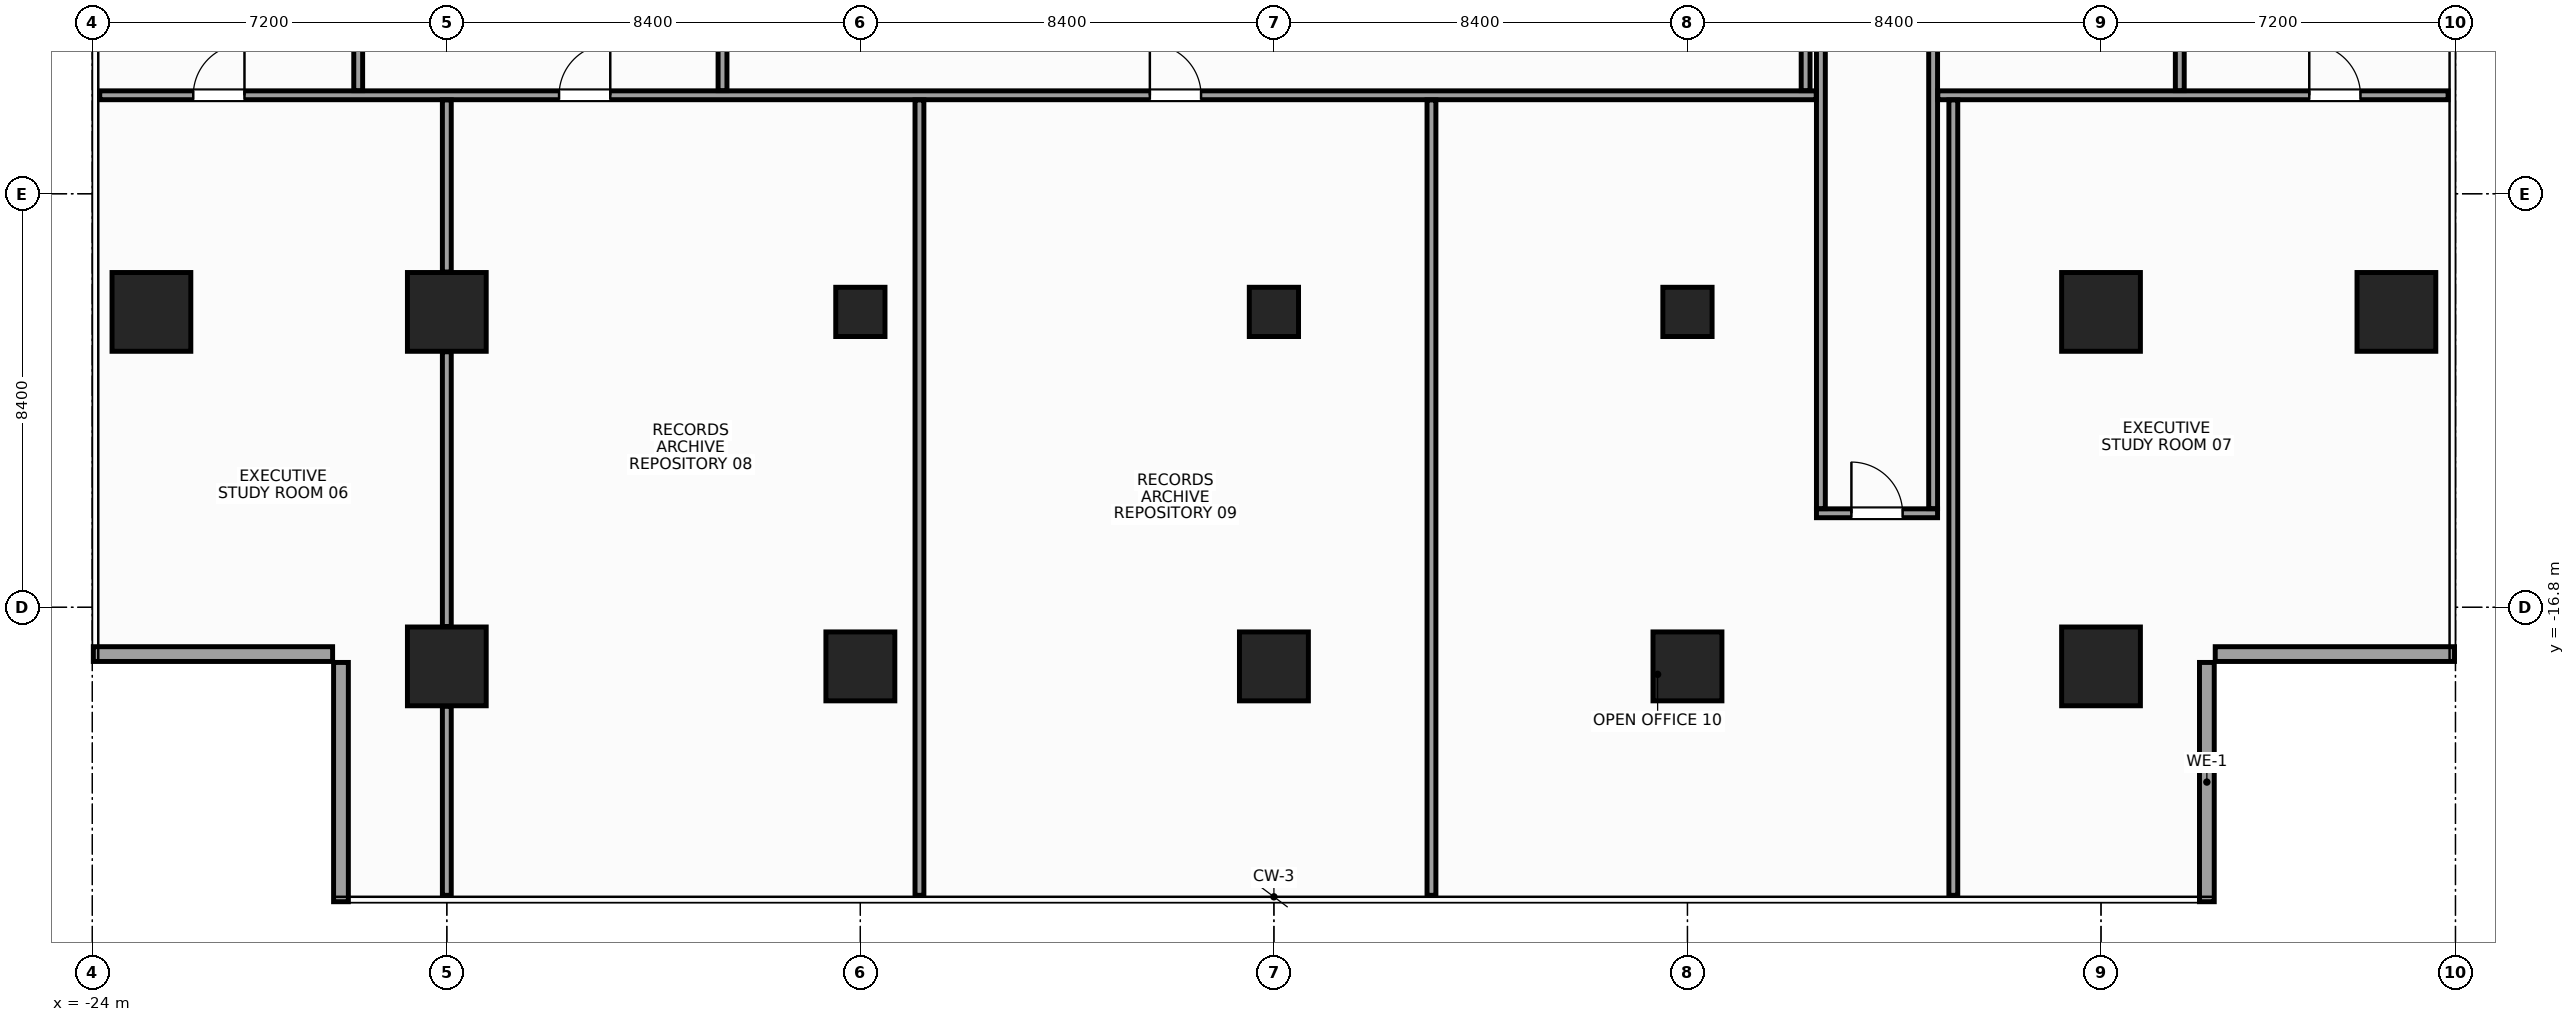
"""IFC4 building model, lengths in metres.
Left out: names, types, materials, properties, quantities, classifications, styles, units other than length and angle.
Written with IfcOpenShell. Run it as: python <this file> out.ifc"""

import sys

from ifc_helpers import new_model, si_unit, direction, frame, frame_2d, origin, origin_2d, place, context, subcontext, project, spatial, rectangle, hollow_rectangle, extrude, source, transform, mapped, element, fill, save


model = new_model("IFC4")
c1 = context("Model", 3, precision=1e-05, world=origin(), true_north=direction((0.0, 1.0)))
c2 = subcontext(c1, "Body", "Model", "MODEL_VIEW")
j1 = project(units=[si_unit("LENGTHUNIT", "METRE"), si_unit("PLANEANGLEUNIT", "RADIAN")], contexts=[c1])
p1 = place(None, origin())
s1 = spatial("IfcSite", under=j1, at=p1, CompositionType="ELEMENT")
p2 = place(p1, origin())
s2 = spatial("IfcBuilding", under=s1, at=p2, CompositionType="ELEMENT")
p3 = place(p2, frame((0.0, 0.0, 171.2)))
s3 = spatial("IfcBuildingStorey", under=s2, at=p3, CompositionType="ELEMENT", Elevation=171.2)
m1 = source(origin(), c2, "Body", "SweptSolid", [
    extrude(rectangle(XDim=1.6, YDim=1.6, at=origin_2d()), origin(), (0.0, 0.0, 1.0), 3.6),
])
for number, where, z_axis, x_axis in (
    (1, (-16.8, -18.0, 0.0), (0.0, 0.0, 1.0), (1.0, 0.0, 0.0)),
    (2, (-16.8, -10.8, 0.0), (0.0, 0.0, 1.0), (1.0, 0.0, 0.0)),
    (3, (16.8, -18.0, 0.0), (0.0, 0.0, 1.0), (1.0, 0.0, 0.0)),
    (4, (16.8, -10.8, 0.0), (0.0, 0.0, 1.0), (1.0, 0.0, 0.0)),
    (5, (-22.8, -10.8, 0.0), (0.0, 0.0, 1.0), (1.0, 0.0, 0.0)),
    (6, (22.8, -10.8, 0.0), (0.0, 0.0, 1.0), (1.0, 0.0, 0.0)),
):
    element("IfcColumn", number, at=place(p3, frame(where, z_axis=z_axis, x_axis=x_axis)), inside=s3, PredefinedType="COLUMN", context=c2, shape_type="MappedRepresentation", body=[
        mapped(m1, transform((0.0, 0.0, 0.0), x_axis=(1.0, 0.0, 0.0), y_axis=(0.0, 1.0, 0.0), z_axis=(0.0, 0.0, 1.0), scale=1.0)),
    ])
m2 = source(origin(), c2, "Body", "SweptSolid", [
    extrude(rectangle(XDim=1.4, YDim=1.4, at=origin_2d()), origin(), (0.0, 0.0, 1.0), 3.6),
])
p4 = place(p3, frame((-8.4, -18.0, 0.0), z_axis=(0.0, 0.0, 1.0), x_axis=(1.0, 0.0, 0.0)))
e7 = element("IfcColumn", 7, at=p4, inside=s3, PredefinedType="COLUMN", context=c2, shape_type="MappedRepresentation", body=[
    mapped(m2, transform((0.0, 0.0, 0.0), x_axis=(1.0, 0.0, 0.0), y_axis=(0.0, 1.0, 0.0), z_axis=(0.0, 0.0, 1.0), scale=1.0)),
])
m3 = source(origin(), c2, "Body", "SweptSolid", [
    extrude(hollow_rectangle(XDim=1.0, YDim=1.0, WallThickness=0.045, at=origin_2d()), origin(), (0.0, 0.0, 1.0), 3.6),
])
p5 = place(p3, frame((-8.4, -10.8, 0.0), z_axis=(0.0, 0.0, 1.0), x_axis=(1.0, 0.0, 0.0)))
e8 = element("IfcColumn", 8, at=p5, inside=s3, PredefinedType="COLUMN", context=c2, shape_type="MappedRepresentation", body=[
    mapped(m3, transform((0.0, 0.0, 0.0), x_axis=(1.0, 0.0, 0.0), y_axis=(0.0, 1.0, 0.0), z_axis=(0.0, 0.0, 1.0), scale=1.0)),
])
p6 = place(p3, frame((8.4, -18.0, 0.0), z_axis=(0.0, 0.0, 1.0), x_axis=(1.0, 0.0, 0.0)))
e9 = element("IfcColumn", 9, at=p6, inside=s3, PredefinedType="COLUMN", context=c2, shape_type="MappedRepresentation", body=[
    mapped(m2, transform((0.0, 0.0, 0.0), x_axis=(1.0, 0.0, 0.0), y_axis=(0.0, 1.0, 0.0), z_axis=(0.0, 0.0, 1.0), scale=1.0)),
])
p7 = place(p3, frame((8.4, -10.8, 0.0), z_axis=(0.0, 0.0, 1.0), x_axis=(1.0, 0.0, 0.0)))
e10 = element("IfcColumn", 10, at=p7, inside=s3, PredefinedType="COLUMN", context=c2, shape_type="MappedRepresentation", body=[
    mapped(m3, transform((0.0, 0.0, 0.0), x_axis=(1.0, 0.0, 0.0), y_axis=(0.0, 1.0, 0.0), z_axis=(0.0, 0.0, 1.0), scale=1.0)),
])
p8 = place(p3, frame((0.0, -18.0, 0.0), z_axis=(0.0, 0.0, 1.0), x_axis=(1.0, 0.0, 0.0)))
e11 = element("IfcColumn", 11, at=p8, inside=s3, PredefinedType="COLUMN", context=c2, shape_type="MappedRepresentation", body=[
    mapped(m2, transform((0.0, 0.0, 0.0), x_axis=(1.0, 0.0, 0.0), y_axis=(0.0, 1.0, 0.0), z_axis=(0.0, 0.0, 1.0), scale=1.0)),
])
m4 = source(origin(), c2, "Body", "SweptSolid", [
    extrude(rectangle(XDim=1.0, YDim=1.0, at=origin_2d()), origin(), (0.0, 0.0, 1.0), 3.6),
])
p9 = place(p3, frame((0.0, -10.8, 0.0), z_axis=(0.0, 0.0, 1.0), x_axis=(1.0, 0.0, 0.0)))
e12 = element("IfcColumn", 12, at=p9, inside=s3, PredefinedType="COLUMN", context=c2, shape_type="MappedRepresentation", body=[
    mapped(m4, transform((0.0, 0.0, 0.0), x_axis=(1.0, 0.0, 0.0), y_axis=(0.0, 1.0, 0.0), z_axis=(0.0, 0.0, 1.0), scale=1.0)),
])
m5 = source(origin(), c2, "Body", "SweptSolid", [
    extrude(rectangle(XDim=4.86, YDim=0.3, at=frame_2d((2.43, 0.0))), origin(), (0.0, 0.0, 1.0), 2.76),
])
p10 = place(p3, frame((18.95, -22.78, 0.0), z_axis=(0.0, 0.0, 1.0), x_axis=(0.0, 1.0, 0.0)))
e13 = element("IfcWall", 13, at=p10, inside=s3, PredefinedType="STANDARD", context=c2, shape_type="MappedRepresentation", body=[
    mapped(m5, transform((0.0, 0.0, 0.0), x_axis=(1.0, 0.0, 0.0), y_axis=(0.0, 1.0, 0.0), z_axis=(0.0, 0.0, 1.0), scale=1.0)),
])
m6 = source(origin(), c2, "Body", "SweptSolid", [
    extrude(rectangle(XDim=4.86, YDim=0.3, at=frame_2d((2.43, 0.0))), origin(), (0.0, 0.0, 1.0), 2.76),
])
for number, where, z_axis, x_axis in (
    (14, (19.12, -17.75, 0.0), (0.0, 0.0, 1.0), (1.0, 0.0, 0.0)),
    (15, (-23.98, -17.75, 0.0), (0.0, 0.0, 1.0), (1.0, 0.0, 0.0)),
):
    element("IfcWall", number, at=place(p3, frame(where, z_axis=z_axis, x_axis=x_axis)), inside=s3, PredefinedType="STANDARD", context=c2, shape_type="MappedRepresentation", body=[
        mapped(m6, transform((0.0, 0.0, 0.0), x_axis=(1.0, 0.0, 0.0), y_axis=(0.0, 1.0, 0.0), z_axis=(0.0, 0.0, 1.0), scale=1.0)),
    ])
p11 = place(p3, frame((-18.95, -17.92, 0.0), z_axis=(0.0, 0.0, 1.0), x_axis=(0.0, -1.0, 0.0)))
e16 = element("IfcWall", 16, at=p11, inside=s3, PredefinedType="STANDARD", context=c2, shape_type="MappedRepresentation", body=[
    mapped(m5, transform((0.0, 0.0, 0.0), x_axis=(1.0, 0.0, 0.0), y_axis=(0.0, 1.0, 0.0), z_axis=(0.0, 0.0, 1.0), scale=1.0)),
])
m7 = source(origin(), c2, "Body", "SweptSolid", [
    extrude(rectangle(XDim=2.46, YDim=0.18, at=frame_2d((1.23, 0.0))), origin(), (0.0, 0.0, 1.0), 3.38),
])
p12 = place(p3, frame((11.02, -14.89, 0.0), z_axis=(0.0, 0.0, 1.0), x_axis=(1.0, 0.0, 0.0)))
e17 = element("IfcWall", 17, at=p12, inside=s3, PredefinedType="PARTITIONING", context=c2, shape_type="MappedRepresentation", body=[
    mapped(m7, transform((0.0, 0.0, 0.0), x_axis=(1.0, 0.0, 0.0), y_axis=(0.0, 1.0, 0.0), z_axis=(0.0, 0.0, 1.0), scale=1.0)),
])
p13 = place(p12, frame((0.71, 0.0, 0.0)))
e18 = element("IfcOpeningElement", 18, at=p13, cuts=e17, PredefinedType="OPENING", context=c2, shape_type="SweptSolid", body=[
    extrude(rectangle(XDim=1.04, YDim=2.2, at=frame_2d((0.52, 1.1))), frame((0.0, 0.102, 0.0), z_axis=(0.0, -1.0, 0.0), x_axis=(1.0, 0.0, 0.0)), (0.0, 0.0, 1.0), 0.204),
])
m8 = source(origin(), c2, "Body", "SweptSolid", [
    extrude(rectangle(XDim=22.595, YDim=0.18, at=frame_2d((11.297, 0.0))), origin(), (0.0, 0.0, 1.0), 2.665),
])
for number, where, z_axis, x_axis in (
    (19, (11.11, -14.795, 0.0), (0.0, 0.0, 1.0), (0.0, 1.0, 0.0)),
    (20, (13.39, -14.795, 0.0), (0.0, 0.0, 1.0), (0.0, 1.0, 0.0)),
):
    element("IfcWall", number, at=place(p3, frame(where, z_axis=z_axis, x_axis=x_axis)), inside=s3, PredefinedType="PARTITIONING", context=c2, shape_type="MappedRepresentation", body=[
        mapped(m8, transform((0.0, 0.0, 0.0), x_axis=(1.0, 0.0, 0.0), y_axis=(0.0, 1.0, 0.0), z_axis=(0.0, 0.0, 1.0), scale=1.0)),
    ])
m9 = source(origin(), c2, "Body", "SweptSolid", [
    extrude(rectangle(XDim=34.865, YDim=0.18, at=frame_2d((17.433, 0.0))), origin(), (0.0, 0.0, 1.0), 2.765),
])
p14 = place(p3, frame((-23.85, -6.4, 0.0), z_axis=(0.0, 0.0, 1.0), x_axis=(1.0, 0.0, 0.0)))
e21 = element("IfcWall", 21, at=p14, inside=s3, PredefinedType="PARTITIONING", context=c2, shape_type="MappedRepresentation", body=[
    mapped(m9, transform((0.0, 0.0, 0.0), x_axis=(1.0, 0.0, 0.0), y_axis=(0.0, 1.0, 0.0), z_axis=(0.0, 0.0, 1.0), scale=1.0)),
])
p15 = place(p14, frame((1.9, 0.0, 0.0)))
e22 = element("IfcOpeningElement", 22, at=p15, cuts=e21, PredefinedType="OPENING", context=c2, shape_type="SweptSolid", body=[
    extrude(rectangle(XDim=1.04, YDim=2.2, at=frame_2d((0.52, 1.1))), frame((0.0, 0.102, 0.0), z_axis=(0.0, -1.0, 0.0), x_axis=(1.0, 0.0, 0.0)), (0.0, 0.0, 1.0), 0.204),
])
p16 = place(p14, frame((9.33, 0.0, 0.0)))
e23 = element("IfcOpeningElement", 23, at=p16, cuts=e21, PredefinedType="OPENING", context=c2, shape_type="SweptSolid", body=[
    extrude(rectangle(XDim=1.04, YDim=2.2, at=frame_2d((0.52, 1.1))), frame((0.0, 0.102, 0.0), z_axis=(0.0, -1.0, 0.0), x_axis=(1.0, 0.0, 0.0)), (0.0, 0.0, 1.0), 0.204),
])
p17 = place(p14, frame((21.33, 0.0, 0.0)))
e24 = element("IfcOpeningElement", 24, at=p17, cuts=e21, PredefinedType="OPENING", context=c2, shape_type="SweptSolid", body=[
    extrude(rectangle(XDim=1.04, YDim=2.2, at=frame_2d((0.52, 1.1))), frame((0.0, 0.102, 0.0), z_axis=(0.0, -1.0, 0.0), x_axis=(1.0, 0.0, 0.0)), (0.0, 0.0, 1.0), 0.204),
])
m10 = source(origin(), c2, "Body", "SweptSolid", [
    extrude(rectangle(XDim=10.365, YDim=0.18, at=frame_2d((5.183, 0.0))), origin(), (0.0, 0.0, 1.0), 2.765),
])
p18 = place(p3, frame((13.485, -6.4, 0.0), z_axis=(0.0, 0.0, 1.0), x_axis=(1.0, 0.0, 0.0)))
e25 = element("IfcWall", 25, at=p18, inside=s3, PredefinedType="PARTITIONING", context=c2, shape_type="MappedRepresentation", body=[
    mapped(m10, transform((0.0, 0.0, 0.0), x_axis=(1.0, 0.0, 0.0), y_axis=(0.0, 1.0, 0.0), z_axis=(0.0, 0.0, 1.0), scale=1.0)),
])
p19 = place(p18, frame((7.545, 0.0, 0.0)))
e26 = element("IfcOpeningElement", 26, at=p19, cuts=e25, PredefinedType="OPENING", context=c2, shape_type="SweptSolid", body=[
    extrude(rectangle(XDim=1.04, YDim=2.2, at=frame_2d((0.52, 1.1))), frame((0.0, 0.102, 0.0), z_axis=(0.0, -1.0, 0.0), x_axis=(1.0, 0.0, 0.0)), (0.0, 0.0, 1.0), 0.204),
])
m11 = source(origin(), c2, "Body", "SweptSolid", [
    extrude(rectangle(XDim=13.92, YDim=0.18, at=frame_2d((6.96, 0.0))), origin(), (0.0, 0.0, 1.0), 2.915),
])
p20 = place(p3, frame((-18.6, -6.305, 0.0), z_axis=(0.0, 0.0, 1.0), x_axis=(0.0, 1.0, 0.0)))
e27 = element("IfcWall", 27, at=p20, inside=s3, PredefinedType="PARTITIONING", context=c2, shape_type="MappedRepresentation", body=[
    mapped(m11, transform((0.0, 0.0, 0.0), x_axis=(1.0, 0.0, 0.0), y_axis=(0.0, 1.0, 0.0), z_axis=(0.0, 0.0, 1.0), scale=1.0)),
])
m12 = source(origin(), c2, "Body", "SweptSolid", [
    extrude(rectangle(XDim=13.92, YDim=0.18, at=frame_2d((6.96, 0.0))), origin(), (0.0, 0.0, 1.0), 2.665),
])
for number, where, z_axis, x_axis in (
    (28, (-11.2, -6.305, 0.0), (0.0, 0.0, 1.0), (0.0, 1.0, 0.0)),
    (29, (10.8, -6.305, 0.0), (0.0, 0.0, 1.0), (0.0, 1.0, 0.0)),
):
    element("IfcWall", number, at=place(p3, frame(where, z_axis=z_axis, x_axis=x_axis)), inside=s3, PredefinedType="PARTITIONING", context=c2, shape_type="MappedRepresentation", body=[
        mapped(m12, transform((0.0, 0.0, 0.0), x_axis=(1.0, 0.0, 0.0), y_axis=(0.0, 1.0, 0.0), z_axis=(0.0, 0.0, 1.0), scale=1.0)),
    ])
p21 = place(p3, frame((18.4, -6.305, 0.0), z_axis=(0.0, 0.0, 1.0), x_axis=(0.0, 1.0, 0.0)))
e30 = element("IfcWall", 30, at=p21, inside=s3, PredefinedType="PARTITIONING", context=c2, shape_type="MappedRepresentation", body=[
    mapped(m11, transform((0.0, 0.0, 0.0), x_axis=(1.0, 0.0, 0.0), y_axis=(0.0, 1.0, 0.0), z_axis=(0.0, 0.0, 1.0), scale=1.0)),
])
m13 = source(origin(), c2, "Body", "SweptSolid", [
    extrude(rectangle(XDim=3.84, YDim=0.18, at=frame_2d((1.92, 0.0))), origin(), (0.0, 0.0, 1.0), 3.38),
])
p22 = place(p3, frame((-16.8, -22.65, 0.0), z_axis=(0.0, 0.0, 1.0), x_axis=(0.0, 1.0, 0.0)))
e31 = element("IfcWall", 31, at=p22, inside=s3, PredefinedType="PARTITIONING", context=c2, shape_type="MappedRepresentation", body=[
    mapped(m13, transform((0.0, 0.0, 0.0), x_axis=(1.0, 0.0, 0.0), y_axis=(0.0, 1.0, 0.0), z_axis=(0.0, 0.0, 1.0), scale=1.0)),
])
m14 = source(origin(), c2, "Body", "SweptSolid", [
    extrude(rectangle(XDim=5.58, YDim=0.18, at=frame_2d((2.79, 0.0))), origin(), (0.0, 0.0, 1.0), 2.965),
])
p23 = place(p3, frame((-16.8, -17.19, 0.0), z_axis=(0.0, 0.0, 1.0), x_axis=(0.0, 1.0, 0.0)))
e32 = element("IfcWall", 32, at=p23, inside=s3, PredefinedType="PARTITIONING", context=c2, shape_type="MappedRepresentation", body=[
    mapped(m14, transform((0.0, 0.0, 0.0), x_axis=(1.0, 0.0, 0.0), y_axis=(0.0, 1.0, 0.0), z_axis=(0.0, 0.0, 1.0), scale=1.0)),
])
m15 = source(origin(), c2, "Body", "SweptSolid", [
    extrude(rectangle(XDim=3.495, YDim=0.18, at=frame_2d((1.748, 0.0))), origin(), (0.0, 0.0, 1.0), 2.765),
])
p24 = place(p3, frame((-16.8, -9.99, 0.0), z_axis=(0.0, 0.0, 1.0), x_axis=(0.0, 1.0, 0.0)))
e33 = element("IfcWall", 33, at=p24, inside=s3, PredefinedType="PARTITIONING", context=c2, shape_type="MappedRepresentation", body=[
    mapped(m15, transform((0.0, 0.0, 0.0), x_axis=(1.0, 0.0, 0.0), y_axis=(0.0, 1.0, 0.0), z_axis=(0.0, 0.0, 1.0), scale=1.0)),
])
m16 = source(origin(), c2, "Body", "SweptSolid", [
    extrude(rectangle(XDim=16.155, YDim=0.18, at=frame_2d((8.077, 0.0))), origin(), (0.0, 0.0, 1.0), 2.915),
])
for number, where, z_axis, x_axis in (
    (34, (-7.2, -22.65, 0.0), (0.0, 0.0, 1.0), (0.0, 1.0, 0.0)),
    (35, (3.2, -22.65, 0.0), (0.0, 0.0, 1.0), (0.0, 1.0, 0.0)),
    (36, (13.8, -22.65, 0.0), (0.0, 0.0, 1.0), (0.0, 1.0, 0.0)),
):
    element("IfcWall", number, at=place(p3, frame(where, z_axis=z_axis, x_axis=x_axis)), inside=s3, PredefinedType="PARTITIONING", context=c2, shape_type="MappedRepresentation", body=[
        mapped(m16, transform((0.0, 0.0, 0.0), x_axis=(1.0, 0.0, 0.0), y_axis=(0.0, 1.0, 0.0), z_axis=(0.0, 0.0, 1.0), scale=1.0)),
    ])
m17 = source(origin(), c2, "Body", "SweptSolid", [
    extrude(rectangle(XDim=1.04, YDim=2.2, at=frame_2d((0.52, 1.1))), frame((0.0, 0.025, 0.0), z_axis=(0.0, -1.0, 0.0), x_axis=(1.0, 0.0, 0.0)), (0.0, 0.0, 1.0), 0.05),
])
p25 = place(p13, origin())
e37 = element("IfcDoor", 37, at=p25, inside=s3, OperationType="SINGLE_SWING_LEFT", PredefinedType="DOOR", context=c2, shape_type="MappedRepresentation", body=[
    mapped(m17, transform((0.0, 0.0, 0.0), x_axis=(1.0, 0.0, 0.0), y_axis=(0.0, 1.0, 0.0), z_axis=(0.0, 0.0, 1.0), scale=1.0)),
])
fill(e18, e37)
p26 = place(p15, origin())
e38 = element("IfcDoor", 38, at=p26, inside=s3, OperationType="SINGLE_SWING_RIGHT", PredefinedType="DOOR", context=c2, shape_type="MappedRepresentation", body=[
    mapped(m17, transform((0.0, 0.0, 0.0), x_axis=(1.0, 0.0, 0.0), y_axis=(0.0, 1.0, 0.0), z_axis=(0.0, 0.0, 1.0), scale=1.0)),
])
fill(e22, e38)
p27 = place(p19, origin())
e39 = element("IfcDoor", 39, at=p27, inside=s3, OperationType="SINGLE_SWING_LEFT", PredefinedType="DOOR", context=c2, shape_type="MappedRepresentation", body=[
    mapped(m17, transform((0.0, 0.0, 0.0), x_axis=(1.0, 0.0, 0.0), y_axis=(0.0, 1.0, 0.0), z_axis=(0.0, 0.0, 1.0), scale=1.0)),
])
fill(e26, e39)
p28 = place(p16, origin())
e40 = element("IfcDoor", 40, at=p28, inside=s3, OperationType="SINGLE_SWING_RIGHT", PredefinedType="DOOR", context=c2, shape_type="MappedRepresentation", body=[
    mapped(m17, transform((0.0, 0.0, 0.0), x_axis=(1.0, 0.0, 0.0), y_axis=(0.0, 1.0, 0.0), z_axis=(0.0, 0.0, 1.0), scale=1.0)),
])
fill(e23, e40)
p29 = place(p17, origin())
e41 = element("IfcDoor", 41, at=p29, inside=s3, OperationType="SINGLE_SWING_LEFT", PredefinedType="DOOR", context=c2, shape_type="MappedRepresentation", body=[
    mapped(m17, transform((0.0, 0.0, 0.0), x_axis=(1.0, 0.0, 0.0), y_axis=(0.0, 1.0, 0.0), z_axis=(0.0, 0.0, 1.0), scale=1.0)),
])
fill(e24, e41)
save(model, sys.argv[1])
